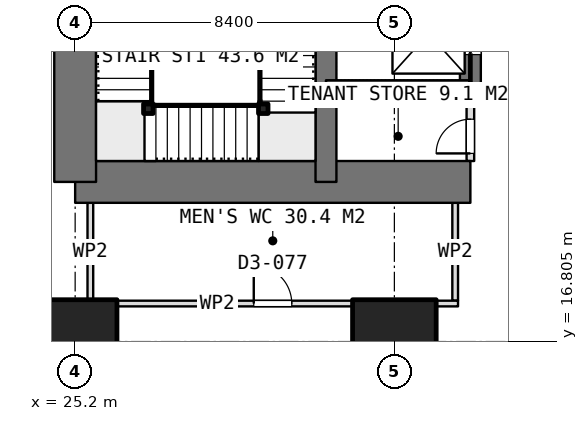
"""IFC4 building model, lengths in metres.
Left out: names, types, materials, properties, quantities, classifications, styles, units other than length and angle.
Written with IfcOpenShell. Run it as: python <this file> out.ifc"""

import sys

from ifc_helpers import new_model, si_unit, direction, frame, frame_2d, origin, origin_2d, place, context, subcontext, project, spatial, rectangle, extrude, element, fill, save


model = new_model("IFC4")
c1 = context("Model", 3, precision=1e-05, world=origin(), true_north=direction((0.0, 1.0)))
c2 = subcontext(c1, "Body", "Model", "MODEL_VIEW")
j1 = project(units=[si_unit("LENGTHUNIT", "METRE"), si_unit("PLANEANGLEUNIT", "RADIAN")], contexts=[c1])
p1 = place(None, origin())
s1 = spatial("IfcSite", under=j1, at=p1, CompositionType="ELEMENT")
p2 = place(p1, origin())
s2 = spatial("IfcBuilding", under=s1, at=p2, CompositionType="ELEMENT")
p3 = place(p2, frame((0.0, 0.0, 70.4)))
s3 = spatial("IfcBuildingStorey", under=s2, at=p3, CompositionType="ELEMENT", Elevation=70.4)
p4 = place(p3, frame((25.2, 21.0, 0.0), z_axis=(0.0, 0.0, 1.0), x_axis=(1.0, 0.0, 0.0)))
e1 = element("IfcWall", 1, at=p4, inside=s3, PredefinedType="SHEAR", context=c2, shape_type="SweptSolid", body=[
    extrude(rectangle(XDim=10.4, YDim=1.1, at=frame_2d((5.2, 0.0))), origin(), (0.0, 0.0, 1.0), 3.75),
])
p5 = place(p3, frame((25.2, 21.0, 0.0), z_axis=(0.0, 0.0, 1.0), x_axis=(0.0, 1.0, 0.0)))
e2 = element("IfcWall", 2, at=p5, inside=s3, PredefinedType="SHEAR", context=c2, shape_type="SweptSolid", body=[
    extrude(rectangle(XDim=25.2, YDim=1.1, at=frame_2d((12.6, 0.0))), origin(), (0.0, 0.0, 1.0), 3.75),
])
p6 = place(p5, frame((7.8, 0.0, 0.0)))
e3 = element("IfcOpeningElement", 3, at=p6, cuts=e2, PredefinedType="OPENING", context=c2, shape_type="SweptSolid", body=[
    extrude(rectangle(XDim=1.2, YDim=2.1, at=frame_2d((0.6, 1.05))), frame((0.0, 0.56, 0.0), z_axis=(0.0, -1.0, 0.0), x_axis=(1.0, 0.0, 0.0)), (0.0, 0.0, 1.0), 1.12),
])
p7 = place(p5, frame((14.25, 0.0, 0.0)))
e4 = element("IfcOpeningElement", 4, at=p7, cuts=e2, PredefinedType="OPENING", context=c2, shape_type="SweptSolid", body=[
    extrude(rectangle(XDim=0.9, YDim=2.1, at=frame_2d((0.45, 1.05))), frame((0.0, 0.56, 0.0), z_axis=(0.0, -1.0, 0.0), x_axis=(1.0, 0.0, 0.0)), (0.0, 0.0, 1.0), 1.12),
])
p8 = place(p5, frame((16.85, 0.0, 0.0)))
e5 = element("IfcOpeningElement", 5, at=p8, cuts=e2, PredefinedType="OPENING", context=c2, shape_type="SweptSolid", body=[
    extrude(rectangle(XDim=0.9, YDim=2.1, at=frame_2d((0.45, 1.05))), frame((0.0, 0.56, 0.0), z_axis=(0.0, -1.0, 0.0), x_axis=(1.0, 0.0, 0.0)), (0.0, 0.0, 1.0), 1.12),
])
p9 = place(p5, frame((19.075, 0.0, 0.0)))
e6 = element("IfcOpeningElement", 6, at=p9, cuts=e2, PredefinedType="OPENING", context=c2, shape_type="SweptSolid", body=[
    extrude(rectangle(XDim=1.2, YDim=2.1, at=frame_2d((0.6, 1.05))), frame((0.0, 0.56, 0.0), z_axis=(0.0, -1.0, 0.0), x_axis=(1.0, 0.0, 0.0)), (0.0, 0.0, 1.0), 1.12),
])
p10 = place(p3, frame((31.8, 21.0, 0.0), z_axis=(0.0, 0.0, 1.0), x_axis=(0.0, 1.0, 0.0)))
e7 = element("IfcWall", 7, at=p10, inside=s3, PredefinedType="SHEAR", context=c2, shape_type="SweptSolid", body=[
    extrude(rectangle(XDim=25.2, YDim=0.55, at=frame_2d((12.6, 0.0))), origin(), (0.0, 0.0, 1.0), 3.75),
])
p11 = place(p3, frame((35.6, 23.4, 0.0), z_axis=(0.0, 0.0, 1.0), x_axis=(0.0, 1.0, 0.0)))
e8 = element("IfcWall", 8, at=p11, inside=s3, PredefinedType="SHEAR", context=c2, shape_type="SweptSolid", body=[
    extrude(rectangle(XDim=18.0, YDim=0.55, at=frame_2d((9.0, 0.0))), origin(), (0.0, 0.0, 1.0), 3.75),
])
p12 = place(p11, frame((0.95, 0.0, 0.0)))
e9 = element("IfcOpeningElement", 9, at=p12, cuts=e8, PredefinedType="OPENING", context=c2, shape_type="SweptSolid", body=[
    extrude(rectangle(XDim=1.1, YDim=2.1, at=frame_2d((0.55, 1.05))), frame((0.0, 0.285, 0.0), z_axis=(0.0, -1.0, 0.0), x_axis=(1.0, 0.0, 0.0)), (0.0, 0.0, 1.0), 0.57),
])
p13 = place(p11, frame((3.95, 0.0, 0.0)))
e10 = element("IfcOpeningElement", 10, at=p13, cuts=e8, PredefinedType="OPENING", context=c2, shape_type="SweptSolid", body=[
    extrude(rectangle(XDim=1.1, YDim=2.1, at=frame_2d((0.55, 1.05))), frame((0.0, 0.285, 0.0), z_axis=(0.0, -1.0, 0.0), x_axis=(1.0, 0.0, 0.0)), (0.0, 0.0, 1.0), 0.57),
])
p14 = place(p11, frame((6.95, 0.0, 0.0)))
e11 = element("IfcOpeningElement", 11, at=p14, cuts=e8, PredefinedType="OPENING", context=c2, shape_type="SweptSolid", body=[
    extrude(rectangle(XDim=1.1, YDim=2.1, at=frame_2d((0.55, 1.05))), frame((0.0, 0.285, 0.0), z_axis=(0.0, -1.0, 0.0), x_axis=(1.0, 0.0, 0.0)), (0.0, 0.0, 1.0), 0.57),
])
p15 = place(p11, frame((9.95, 0.0, 0.0)))
e12 = element("IfcOpeningElement", 12, at=p15, cuts=e8, PredefinedType="OPENING", context=c2, shape_type="SweptSolid", body=[
    extrude(rectangle(XDim=1.1, YDim=2.1, at=frame_2d((0.55, 1.05))), frame((0.0, 0.285, 0.0), z_axis=(0.0, -1.0, 0.0), x_axis=(1.0, 0.0, 0.0)), (0.0, 0.0, 1.0), 0.57),
])
p16 = place(p11, frame((12.95, 0.0, 0.0)))
e13 = element("IfcOpeningElement", 13, at=p16, cuts=e8, PredefinedType="OPENING", context=c2, shape_type="SweptSolid", body=[
    extrude(rectangle(XDim=1.1, YDim=2.1, at=frame_2d((0.55, 1.05))), frame((0.0, 0.285, 0.0), z_axis=(0.0, -1.0, 0.0), x_axis=(1.0, 0.0, 0.0)), (0.0, 0.0, 1.0), 0.57),
])
p17 = place(p11, frame((15.95, 0.0, 0.0)))
e14 = element("IfcOpeningElement", 14, at=p17, cuts=e8, PredefinedType="OPENING", context=c2, shape_type="SweptSolid", body=[
    extrude(rectangle(XDim=1.1, YDim=2.1, at=frame_2d((0.55, 1.05))), frame((0.0, 0.285, 0.0), z_axis=(0.0, -1.0, 0.0), x_axis=(1.0, 0.0, 0.0)), (0.0, 0.0, 1.0), 0.57),
])
p18 = place(p3, frame((31.8, 23.4, 0.0), z_axis=(0.0, 0.0, 1.0), x_axis=(1.0, 0.0, 0.0)))
e15 = element("IfcWall", 15, at=p18, inside=s3, PredefinedType="SHEAR", context=c2, shape_type="SweptSolid", body=[
    extrude(rectangle(XDim=3.8, YDim=0.55, at=frame_2d((1.9, 0.0))), origin(), (0.0, 0.0, 1.0), 3.75),
])
for number, where, z_axis, x_axis in (
    (16, (25.2, 16.8, 0.0), (0.0, 0.0, 1.0), (1.0, 0.0, 0.0)),
    (17, (33.6, 16.8, 0.0), (0.0, 0.0, 1.0), (1.0, 0.0, 0.0)),
):
    element("IfcColumn", number, at=place(p3, frame(where, z_axis=z_axis, x_axis=x_axis)), inside=s3, PredefinedType="COLUMN", context=c2, shape_type="SweptSolid", body=[
        extrude(rectangle(XDim=2.2, YDim=2.2, at=origin_2d()), origin(), (0.0, 0.0, 1.0), 3.75),
    ])
p19 = place(p3, frame((35.6, 21.55, 0.0), z_axis=(0.0, 0.0, 1.0), x_axis=(0.0, 1.0, 0.0)))
e18 = element("IfcWall", 18, at=p19, inside=s3, PredefinedType="PARTITIONING", context=c2, shape_type="SweptSolid", body=[
    extrude(rectangle(XDim=1.575, YDim=0.2, at=frame_2d((0.788, 0.0))), origin(), (0.0, 0.0, 1.0), 3.5),
])
p20 = place(p19, frame((0.2, 0.0, 0.0)))
e19 = element("IfcOpeningElement", 19, at=p20, cuts=e18, PredefinedType="OPENING", context=c2, shape_type="SweptSolid", body=[
    extrude(rectangle(XDim=0.9, YDim=2.1, at=frame_2d((0.45, 1.05))), frame((0.0, 0.11, 0.0), z_axis=(0.0, -1.0, 0.0), x_axis=(1.0, 0.0, 0.0)), (0.0, 0.0, 1.0), 0.22),
])
p21 = place(p3, frame((25.525, 17.8, 0.0), z_axis=(0.0, 0.0, 1.0), x_axis=(1.0, 0.0, 0.0)))
e20 = element("IfcWall", 20, at=p21, inside=s3, PredefinedType="PARTITIONING", context=c2, shape_type="SweptSolid", body=[
    extrude(rectangle(XDim=9.75, YDim=0.15, at=frame_2d((4.875, 0.0))), origin(), (0.0, 0.0, 1.0), 3.5),
])
p22 = place(p21, frame((4.375, 0.0, 0.0)))
e21 = element("IfcOpeningElement", 21, at=p22, cuts=e20, PredefinedType="OPENING", context=c2, shape_type="SweptSolid", body=[
    extrude(rectangle(XDim=1.0, YDim=2.1, at=frame_2d((0.5, 1.05))), frame((0.0, 0.085, 0.0), z_axis=(0.0, -1.0, 0.0), x_axis=(1.0, 0.0, 0.0)), (0.0, 0.0, 1.0), 0.17),
])
for number, where, z_axis, x_axis in (
    (22, (25.6, 17.875, 0.0), (0.0, 0.0, 1.0), (0.0, 1.0, 0.0)),
    (23, (35.2, 17.875, 0.0), (0.0, 0.0, 1.0), (0.0, 1.0, 0.0)),
):
    element("IfcWall", number, at=place(p3, frame(where, z_axis=z_axis, x_axis=x_axis)), inside=s3, PredefinedType="PARTITIONING", context=c2, shape_type="SweptSolid", body=[
        extrude(rectangle(XDim=2.575, YDim=0.15, at=frame_2d((1.288, 0.0))), origin(), (0.0, 0.0, 1.0), 3.5),
    ])
for number, where, z_axis, x_axis in (
    (24, (30.15, 22.925, 0.0), (0.0, 0.0, 1.0), (1.0, 0.0, 0.0)),
    (25, (27.125, 22.925, 0.0), (0.0, 0.0, 1.0), (1.0, 0.0, 0.0)),
):
    element("IfcColumn", number, at=place(p3, frame(where, z_axis=z_axis, x_axis=x_axis)), inside=s3, PredefinedType="COLUMN", context=c2, shape_type="SweptSolid", body=[
        extrude(rectangle(XDim=0.25, YDim=0.25, at=origin_2d()), origin(), (0.0, 0.0, 1.0), 3.75),
    ])
p23 = place(p20, origin())
e26 = element("IfcDoor", 26, at=p23, inside=s3, OperationType="SINGLE_SWING_LEFT", PredefinedType="DOOR", context=c2, shape_type="SweptSolid", body=[
    extrude(rectangle(XDim=0.9, YDim=2.1, at=frame_2d((0.45, 1.05))), frame((0.0, 0.025, 0.0), z_axis=(0.0, -1.0, 0.0), x_axis=(1.0, 0.0, 0.0)), (0.0, 0.0, 1.0), 0.05),
])
fill(e19, e26)
p24 = place(p12, origin())
e27 = element("IfcDoor", 27, at=p24, inside=s3, OperationType="SLIDING_TO_LEFT", PredefinedType="USERDEFINED", context=c2, shape_type="SweptSolid", body=[
    extrude(rectangle(XDim=1.1, YDim=2.1, at=frame_2d((0.55, 1.05))), frame((0.0, 0.025, 0.0), z_axis=(0.0, -1.0, 0.0), x_axis=(1.0, 0.0, 0.0)), (0.0, 0.0, 1.0), 0.05),
])
fill(e9, e27)
p25 = place(p22, origin())
e28 = element("IfcDoor", 28, at=p25, inside=s3, OperationType="SINGLE_SWING_LEFT", PredefinedType="DOOR", context=c2, shape_type="SweptSolid", body=[
    extrude(rectangle(XDim=1.0, YDim=2.1, at=frame_2d((0.5, 1.05))), frame((0.0, 0.025, 0.0), z_axis=(0.0, -1.0, 0.0), x_axis=(1.0, 0.0, 0.0)), (0.0, 0.0, 1.0), 0.05),
])
fill(e21, e28)
save(model, sys.argv[1])
